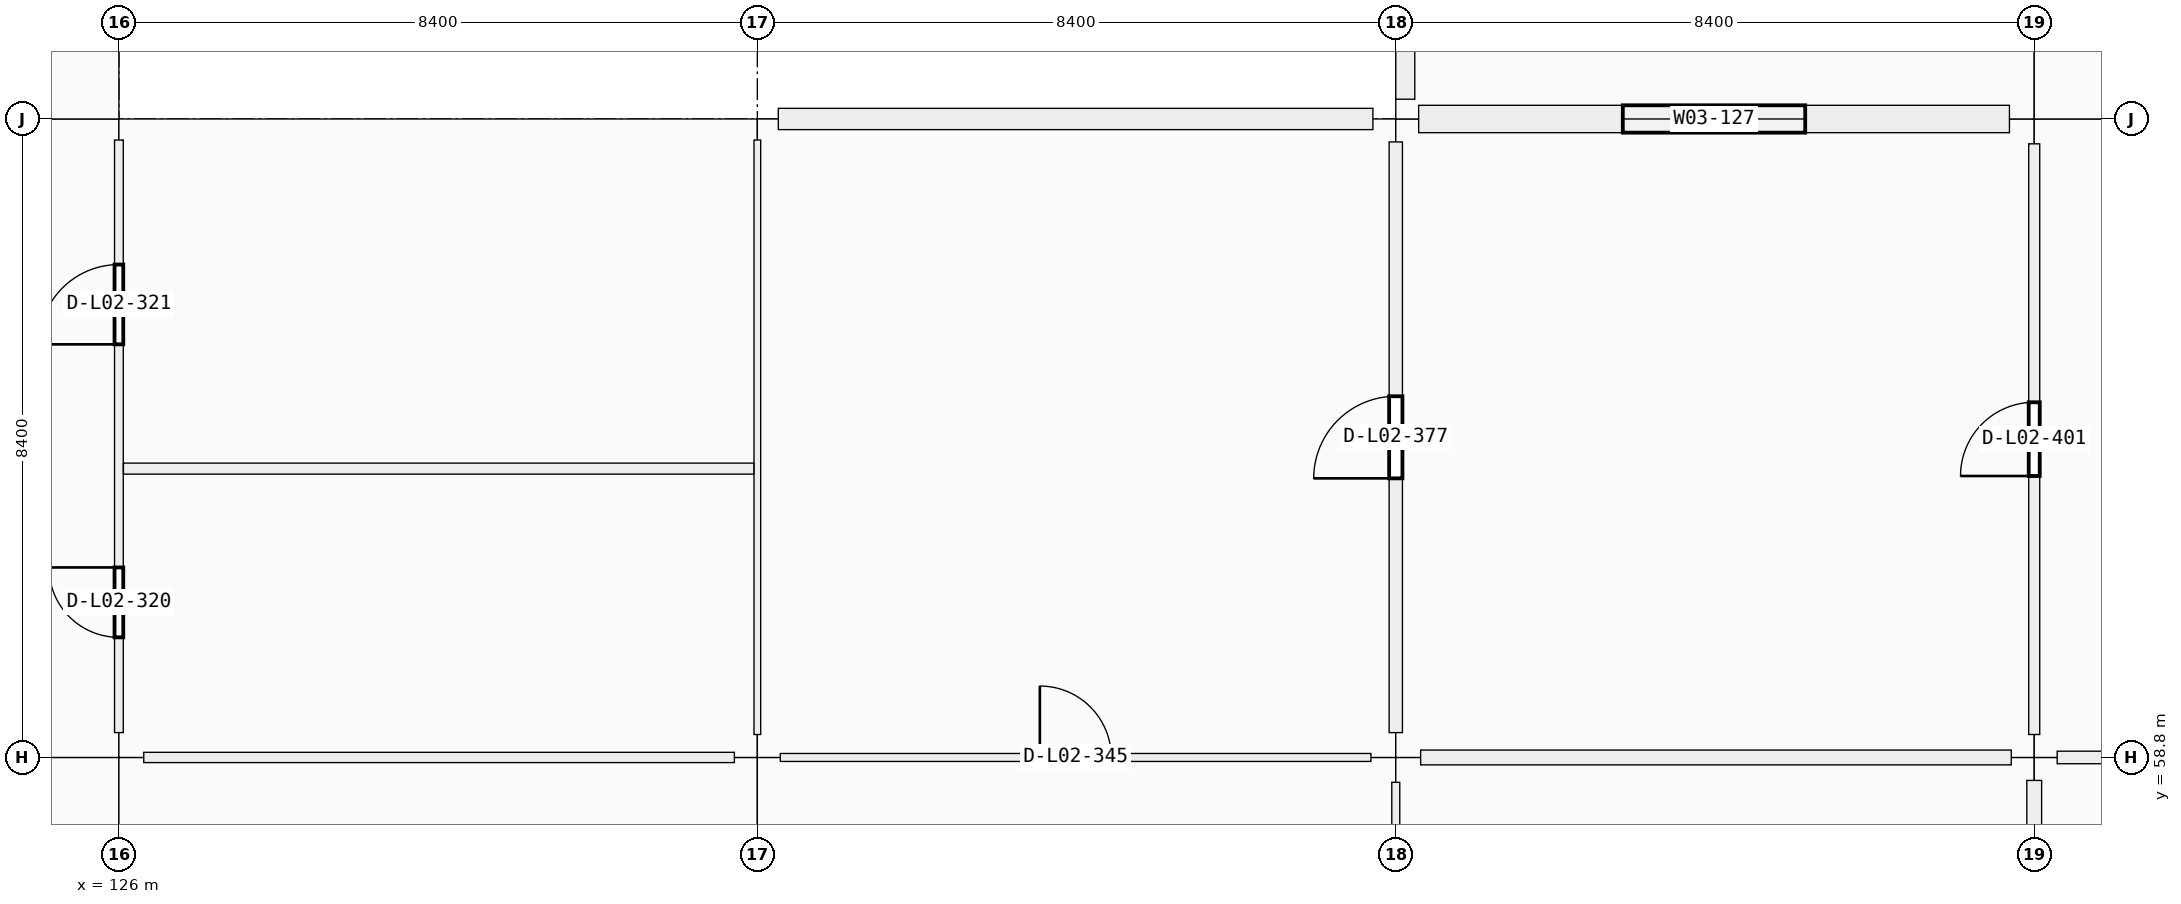
"""IFC4 building model, lengths in metres.
Left out: names, types, materials, properties, quantities, classifications, styles, units other than length and angle.
Written with IfcOpenShell. Run it as: python <this file> out.ifc"""

import sys

from ifc_helpers import new_model, si_unit, direction, frame, frame_2d, origin, origin_2d, place, context, subcontext, project, spatial, rectangle, extrude, element, fill, save


model = new_model("IFC4")
c1 = context("Model", 3, precision=1e-05, world=origin(), true_north=direction((0.0, 1.0)))
c2 = subcontext(c1, "Body", "Model", "MODEL_VIEW")
j1 = project(units=[si_unit("LENGTHUNIT", "METRE"), si_unit("PLANEANGLEUNIT", "RADIAN")], contexts=[c1])
p1 = place(None, origin())
s1 = spatial("IfcSite", under=j1, at=p1, CompositionType="ELEMENT")
p2 = place(p1, origin())
s2 = spatial("IfcBuilding", under=s1, at=p2, CompositionType="ELEMENT")
p3 = place(p2, frame((0.0, 0.0, 10.26)))
s3 = spatial("IfcBuildingStorey", under=s2, at=p3, CompositionType="ELEMENT", Elevation=10.26)
p4 = place(p3, frame((126.0, 58.8, 0.0), z_axis=(0.0, 0.0, 1.0), x_axis=(1.0, 0.0, 0.0)))
e1 = element("IfcColumn", 1, at=p4, inside=s3, PredefinedType="COLUMN", context=c2, shape_type="SweptSolid", body=[
    extrude(rectangle(XDim=0.65, YDim=0.65, at=origin_2d()), origin(), (0.0, 0.0, 1.0), 4.5),
])
p5 = place(p3, frame((126.0, 67.2, 0.0), z_axis=(0.0, 0.0, 1.0), x_axis=(1.0, 0.0, 0.0)))
e2 = element("IfcColumn", 2, at=p5, inside=s3, PredefinedType="COLUMN", context=c2, shape_type="SweptSolid", body=[
    extrude(rectangle(XDim=0.55, YDim=0.55, at=origin_2d()), origin(), (0.0, 0.0, 1.0), 4.25),
])
p6 = place(p3, frame((134.4, 58.8, 0.0), z_axis=(0.0, 0.0, 1.0), x_axis=(1.0, 0.0, 0.0)))
e3 = element("IfcColumn", 3, at=p6, inside=s3, PredefinedType="COLUMN", context=c2, shape_type="SweptSolid", body=[
    extrude(rectangle(XDim=0.6, YDim=0.6, at=origin_2d()), origin(), (0.0, 0.0, 1.0), 4.5),
])
p7 = place(p3, frame((134.4, 67.2, 0.0), z_axis=(0.0, 0.0, 1.0), x_axis=(1.0, 0.0, 0.0)))
e4 = element("IfcColumn", 4, at=p7, inside=s3, PredefinedType="COLUMN", context=c2, shape_type="SweptSolid", body=[
    extrude(rectangle(XDim=0.55, YDim=0.55, at=origin_2d()), origin(), (0.0, 0.0, 1.0), 4.25),
])
p8 = place(p3, frame((142.8, 58.8, 0.0), z_axis=(0.0, 0.0, 1.0), x_axis=(1.0, 0.0, 0.0)))
e5 = element("IfcColumn", 5, at=p8, inside=s3, PredefinedType="COLUMN", context=c2, shape_type="SweptSolid", body=[
    extrude(rectangle(XDim=0.65, YDim=0.65, at=origin_2d()), origin(), (0.0, 0.0, 1.0), 4.5),
])
for number, where, z_axis, x_axis in (
    (6, (142.8, 67.2, 0.0), (0.0, 0.0, 1.0), (1.0, 0.0, 0.0)),
    (7, (151.2, 58.8, 0.0), (0.0, 0.0, 1.0), (1.0, 0.0, 0.0)),
):
    element("IfcColumn", number, at=place(p3, frame(where, z_axis=z_axis, x_axis=x_axis)), inside=s3, PredefinedType="COLUMN", context=c2, shape_type="SweptSolid", body=[
        extrude(rectangle(XDim=0.6, YDim=0.6, at=origin_2d()), origin(), (0.0, 0.0, 1.0), 4.5),
    ])
p9 = place(p3, frame((151.2, 67.2, 0.0), z_axis=(0.0, 0.0, 1.0), x_axis=(1.0, 0.0, 0.0)))
e8 = element("IfcColumn", 8, at=p9, inside=s3, PredefinedType="COLUMN", context=c2, shape_type="SweptSolid", body=[
    extrude(rectangle(XDim=0.65, YDim=0.65, at=origin_2d()), origin(), (0.0, 0.0, 1.0), 4.5),
])
p10 = place(p3, frame((134.676, 67.2, 0.0), z_axis=(0.0, 0.0, 1.0), x_axis=(1.0, 0.0, 0.0)))
e9 = element("IfcWall", 9, at=p10, inside=s3, PredefinedType="SOLIDWALL", context=c2, shape_type="SweptSolid", body=[
    extrude(rectangle(XDim=7.823, YDim=0.28, at=frame_2d((3.912, 0.0))), origin(), (0.0, 0.0, 1.0), 3.54),
])
p11 = place(p10, frame((2.737, 0.0, 0.9)))
e10 = element("IfcOpeningElement", 10, at=p11, cuts=e9, PredefinedType="OPENING", context=c2, shape_type="SweptSolid", body=[
    extrude(rectangle(XDim=2.35, YDim=1.6, at=frame_2d((1.175, 0.8))), frame((0.0, 0.14, 0.0), z_axis=(0.0, -1.0, 0.0), x_axis=(1.0, 0.0, 0.0)), (0.0, 0.0, 1.0), 0.28),
])
p12 = place(p3, frame((143.101, 67.2, 0.0), z_axis=(0.0, 0.0, 1.0), x_axis=(1.0, 0.0, 0.0)))
e11 = element("IfcWall", 11, at=p12, inside=s3, PredefinedType="SOLIDWALL", context=c2, shape_type="SweptSolid", body=[
    extrude(rectangle(XDim=7.773, YDim=0.36, at=frame_2d((3.886, 0.0))), origin(), (0.0, 0.0, 1.0), 3.54),
])
p13 = place(p12, frame((2.686, 0.0, 0.9)))
e12 = element("IfcOpeningElement", 12, at=p13, cuts=e11, PredefinedType="OPENING", context=c2, shape_type="SweptSolid", body=[
    extrude(rectangle(XDim=2.4, YDim=1.8, at=frame_2d((1.2, 0.9))), frame((0.0, 0.18, 0.0), z_axis=(0.0, -1.0, 0.0), x_axis=(1.0, 0.0, 0.0)), (0.0, 0.0, 1.0), 0.36),
])
p14 = place(p3, frame((142.925, 67.46, 0.0), z_axis=(0.0, 0.0, 1.0), x_axis=(0.0, 1.0, 0.0)))
e13 = element("IfcWall", 13, at=p14, inside=s3, PredefinedType="PARAPET", context=c2, shape_type="SweptSolid", body=[
    extrude(rectangle(XDim=7.88, YDim=0.25, at=frame_2d((3.94, 0.0))), origin(), (0.0, 0.0, 1.0), 0.95),
])
p15 = place(p3, frame((126.327, 58.8, 0.0), z_axis=(0.0, 0.0, 1.0), x_axis=(1.0, 0.0, 0.0)))
e14 = element("IfcWall", 14, at=p15, inside=s3, PredefinedType="PARTITIONING", context=c2, shape_type="SweptSolid", body=[
    extrude(rectangle(XDim=7.771, YDim=0.135, at=frame_2d((3.885, 0.0))), origin(), (0.0, 0.0, 1.0), 3.37),
])
p16 = place(p3, frame((134.702, 58.8, 0.0), z_axis=(0.0, 0.0, 1.0), x_axis=(1.0, 0.0, 0.0)))
e15 = element("IfcWall", 15, at=p16, inside=s3, PredefinedType="PARTITIONING", context=c2, shape_type="SweptSolid", body=[
    extrude(rectangle(XDim=7.771, YDim=0.105, at=frame_2d((3.885, 0.0))), origin(), (0.0, 0.0, 1.0), 3.37),
])
p17 = place(p16, frame((3.415, 0.0, 0.0)))
e16 = element("IfcOpeningElement", 16, at=p17, cuts=e15, PredefinedType="OPENING", context=c2, shape_type="SweptSolid", body=[
    extrude(rectangle(XDim=0.94, YDim=2.15, at=frame_2d((0.47, 1.075))), frame((0.0, 0.052, 0.0), z_axis=(0.0, -1.0, 0.0), x_axis=(1.0, 0.0, 0.0)), (0.0, 0.0, 1.0), 0.105),
])
p18 = place(p3, frame((143.127, 58.8, 0.0), z_axis=(0.0, 0.0, 1.0), x_axis=(1.0, 0.0, 0.0)))
e17 = element("IfcWall", 17, at=p18, inside=s3, PredefinedType="PARTITIONING", context=c2, shape_type="SweptSolid", body=[
    extrude(rectangle(XDim=7.771, YDim=0.195, at=frame_2d((3.885, 0.0))), origin(), (0.0, 0.0, 1.0), 3.37),
])
p19 = place(p3, frame((151.502, 58.8, 0.0), z_axis=(0.0, 0.0, 1.0), x_axis=(1.0, 0.0, 0.0)))
e18 = element("IfcWall", 18, at=p19, inside=s3, PredefinedType="PARTITIONING", context=c2, shape_type="SweptSolid", body=[
    extrude(rectangle(XDim=7.771, YDim=0.165, at=frame_2d((3.885, 0.0))), origin(), (0.0, 0.0, 1.0), 3.37),
])
p20 = place(p19, frame((3.415, 0.0, 0.0)))
e19 = element("IfcOpeningElement", 19, at=p20, cuts=e18, PredefinedType="OPENING", context=c2, shape_type="SweptSolid", body=[
    extrude(rectangle(XDim=0.94, YDim=2.15, at=frame_2d((0.47, 1.075))), frame((0.0, 0.083, 0.0), z_axis=(0.0, -1.0, 0.0), x_axis=(1.0, 0.0, 0.0)), (0.0, 0.0, 1.0), 0.165),
])
p21 = place(p3, frame((126.0, 59.127, 0.0), z_axis=(0.0, 0.0, 1.0), x_axis=(0.0, 1.0, 0.0)))
e20 = element("IfcWall", 20, at=p21, inside=s3, PredefinedType="PARTITIONING", context=c2, shape_type="SweptSolid", body=[
    extrude(rectangle(XDim=7.796, YDim=0.115, at=frame_2d((3.898, 0.0))), origin(), (0.0, 0.0, 1.0), 3.37),
])
p22 = place(p21, frame((1.253, 0.0, 0.0)))
e21 = element("IfcOpeningElement", 21, at=p22, cuts=e20, PredefinedType="OPENING", context=c2, shape_type="SweptSolid", body=[
    extrude(rectangle(XDim=0.92, YDim=2.15, at=frame_2d((0.46, 1.075))), frame((0.0, 0.058, 0.0), z_axis=(0.0, -1.0, 0.0), x_axis=(1.0, 0.0, 0.0)), (0.0, 0.0, 1.0), 0.115),
])
p23 = place(p21, frame((5.108, 0.0, 0.0)))
e22 = element("IfcOpeningElement", 22, at=p23, cuts=e20, PredefinedType="OPENING", context=c2, shape_type="SweptSolid", body=[
    extrude(rectangle(XDim=1.05, YDim=2.12, at=frame_2d((0.525, 1.06))), frame((0.0, 0.058, 0.0), z_axis=(0.0, -1.0, 0.0), x_axis=(1.0, 0.0, 0.0)), (0.0, 0.0, 1.0), 0.115),
])
p24 = place(p3, frame((134.4, 59.102, 0.0), z_axis=(0.0, 0.0, 1.0), x_axis=(0.0, 1.0, 0.0)))
e23 = element("IfcWall", 23, at=p24, inside=s3, PredefinedType="PARTITIONING", context=c2, shape_type="SweptSolid", body=[
    extrude(rectangle(XDim=7.821, YDim=0.088, at=frame_2d((3.911, 0.0))), origin(), (0.0, 0.0, 1.0), 3.37),
])
p25 = place(p3, frame((142.8, 50.702, 0.0), z_axis=(0.0, 0.0, 1.0), x_axis=(0.0, 1.0, 0.0)))
e24 = element("IfcWall", 24, at=p25, inside=s3, PredefinedType="PARTITIONING", context=c2, shape_type="SweptSolid", body=[
    extrude(rectangle(XDim=7.771, YDim=0.105, at=frame_2d((3.885, 0.0))), origin(), (0.0, 0.0, 1.0), 3.37),
])
p26 = place(p25, frame((0.673, 0.0, 0.0)))
e25 = element("IfcOpeningElement", 25, at=p26, cuts=e24, PredefinedType="OPENING", context=c2, shape_type="SweptSolid", body=[
    extrude(rectangle(XDim=0.98, YDim=2.08, at=frame_2d((0.49, 1.04))), frame((0.0, 0.052, 0.0), z_axis=(0.0, -1.0, 0.0), x_axis=(1.0, 0.0, 0.0)), (0.0, 0.0, 1.0), 0.105),
])
p27 = place(p25, frame((4.613, 0.0, 0.0)))
e26 = element("IfcOpeningElement", 26, at=p27, cuts=e24, PredefinedType="OPENING", context=c2, shape_type="SweptSolid", body=[
    extrude(rectangle(XDim=0.94, YDim=2.08, at=frame_2d((0.47, 1.04))), frame((0.0, 0.052, 0.0), z_axis=(0.0, -1.0, 0.0), x_axis=(1.0, 0.0, 0.0)), (0.0, 0.0, 1.0), 0.105),
])
p28 = place(p3, frame((142.8, 59.127, 0.0), z_axis=(0.0, 0.0, 1.0), x_axis=(0.0, 1.0, 0.0)))
e27 = element("IfcWall", 27, at=p28, inside=s3, PredefinedType="PARTITIONING", context=c2, shape_type="SweptSolid", body=[
    extrude(rectangle(XDim=7.771, YDim=0.175, at=frame_2d((3.885, 0.0))), origin(), (0.0, 0.0, 1.0), 3.37),
])
p29 = place(p28, frame((3.345, 0.0, 0.0)))
e28 = element("IfcOpeningElement", 28, at=p29, cuts=e27, PredefinedType="OPENING", context=c2, shape_type="SweptSolid", body=[
    extrude(rectangle(XDim=1.08, YDim=2.25, at=frame_2d((0.54, 1.125))), frame((0.0, 0.087, 0.0), z_axis=(0.0, -1.0, 0.0), x_axis=(1.0, 0.0, 0.0)), (0.0, 0.0, 1.0), 0.175),
])
p30 = place(p3, frame((151.2, 50.727, 0.0), z_axis=(0.0, 0.0, 1.0), x_axis=(0.0, 1.0, 0.0)))
e29 = element("IfcWall", 29, at=p30, inside=s3, PredefinedType="PARTITIONING", context=c2, shape_type="SweptSolid", body=[
    extrude(rectangle(XDim=7.771, YDim=0.195, at=frame_2d((3.885, 0.0))), origin(), (0.0, 0.0, 1.0), 3.37),
])
p31 = place(p3, frame((151.2, 59.102, 0.0), z_axis=(0.0, 0.0, 1.0), x_axis=(0.0, 1.0, 0.0)))
e30 = element("IfcWall", 30, at=p31, inside=s3, PredefinedType="PARTITIONING", context=c2, shape_type="SweptSolid", body=[
    extrude(rectangle(XDim=7.771, YDim=0.145, at=frame_2d((3.885, 0.0))), origin(), (0.0, 0.0, 1.0), 3.37),
])
p32 = place(p31, frame((3.401, 0.0, 0.0)))
e31 = element("IfcOpeningElement", 31, at=p32, cuts=e30, PredefinedType="OPENING", context=c2, shape_type="SweptSolid", body=[
    extrude(rectangle(XDim=0.97, YDim=2.12, at=frame_2d((0.485, 1.06))), frame((0.0, 0.073, 0.0), z_axis=(0.0, -1.0, 0.0), x_axis=(1.0, 0.0, 0.0)), (0.0, 0.0, 1.0), 0.145),
])
p33 = place(p3, frame((126.06, 62.6, 0.0), z_axis=(0.0, 0.0, 1.0), x_axis=(1.0, 0.0, 0.0)))
e32 = element("IfcWall", 32, at=p33, inside=s3, PredefinedType="PARTITIONING", context=c2, shape_type="SweptSolid", body=[
    extrude(rectangle(XDim=8.294, YDim=0.145, at=frame_2d((4.147, 0.0))), origin(), (0.0, 0.0, 1.0), 3.37),
])
p34 = place(p11, origin())
e33 = element("IfcWindow", 33, at=p34, inside=s3, PartitioningType="SINGLE_PANEL", PredefinedType="WINDOW", context=c2, shape_type="SweptSolid", body=[
    extrude(rectangle(XDim=2.35, YDim=1.6, at=frame_2d((1.175, 0.8))), frame((0.0, 0.03, 0.0), z_axis=(0.0, -1.0, 0.0), x_axis=(1.0, 0.0, 0.0)), (0.0, 0.0, 1.0), 0.06),
])
fill(e10, e33)
p35 = place(p13, origin())
e34 = element("IfcWindow", 34, at=p35, inside=s3, PartitioningType="SINGLE_PANEL", PredefinedType="WINDOW", context=c2, shape_type="SweptSolid", body=[
    extrude(rectangle(XDim=2.4, YDim=1.8, at=frame_2d((1.2, 0.9))), frame((0.0, 0.03, 0.0), z_axis=(0.0, -1.0, 0.0), x_axis=(1.0, 0.0, 0.0)), (0.0, 0.0, 1.0), 0.06),
])
fill(e12, e34)
p36 = place(p22, origin())
e35 = element("IfcDoor", 35, at=p36, inside=s3, OperationType="SINGLE_SWING_RIGHT", PredefinedType="DOOR", context=c2, shape_type="SweptSolid", body=[
    extrude(rectangle(XDim=0.92, YDim=2.15, at=frame_2d((0.46, 1.075))), frame((0.0, 0.025, 0.0), z_axis=(0.0, -1.0, 0.0), x_axis=(1.0, 0.0, 0.0)), (0.0, 0.0, 1.0), 0.05),
])
fill(e21, e35)
p37 = place(p23, origin())
e36 = element("IfcDoor", 36, at=p37, inside=s3, OperationType="SINGLE_SWING_LEFT", PredefinedType="DOOR", context=c2, shape_type="SweptSolid", body=[
    extrude(rectangle(XDim=1.05, YDim=2.12, at=frame_2d((0.525, 1.06))), frame((0.0, 0.025, 0.0), z_axis=(0.0, -1.0, 0.0), x_axis=(1.0, 0.0, 0.0)), (0.0, 0.0, 1.0), 0.05),
])
fill(e22, e36)
p38 = place(p17, origin())
e37 = element("IfcDoor", 37, at=p38, inside=s3, OperationType="SINGLE_SWING_LEFT", PredefinedType="DOOR", context=c2, shape_type="SweptSolid", body=[
    extrude(rectangle(XDim=0.94, YDim=2.15, at=frame_2d((0.47, 1.075))), frame((0.0, 0.025, 0.0), z_axis=(0.0, -1.0, 0.0), x_axis=(1.0, 0.0, 0.0)), (0.0, 0.0, 1.0), 0.05),
])
fill(e16, e37)
p39 = place(p29, origin())
e38 = element("IfcDoor", 38, at=p39, inside=s3, OperationType="SINGLE_SWING_LEFT", PredefinedType="DOOR", context=c2, shape_type="SweptSolid", body=[
    extrude(rectangle(XDim=1.08, YDim=2.25, at=frame_2d((0.54, 1.125))), frame((0.0, 0.025, 0.0), z_axis=(0.0, -1.0, 0.0), x_axis=(1.0, 0.0, 0.0)), (0.0, 0.0, 1.0), 0.05),
])
fill(e28, e38)
p40 = place(p32, origin())
e39 = element("IfcDoor", 39, at=p40, inside=s3, OperationType="SINGLE_SWING_LEFT", PredefinedType="DOOR", context=c2, shape_type="SweptSolid", body=[
    extrude(rectangle(XDim=0.97, YDim=2.12, at=frame_2d((0.485, 1.06))), frame((0.0, 0.025, 0.0), z_axis=(0.0, -1.0, 0.0), x_axis=(1.0, 0.0, 0.0)), (0.0, 0.0, 1.0), 0.05),
])
fill(e31, e39)
save(model, sys.argv[1])
